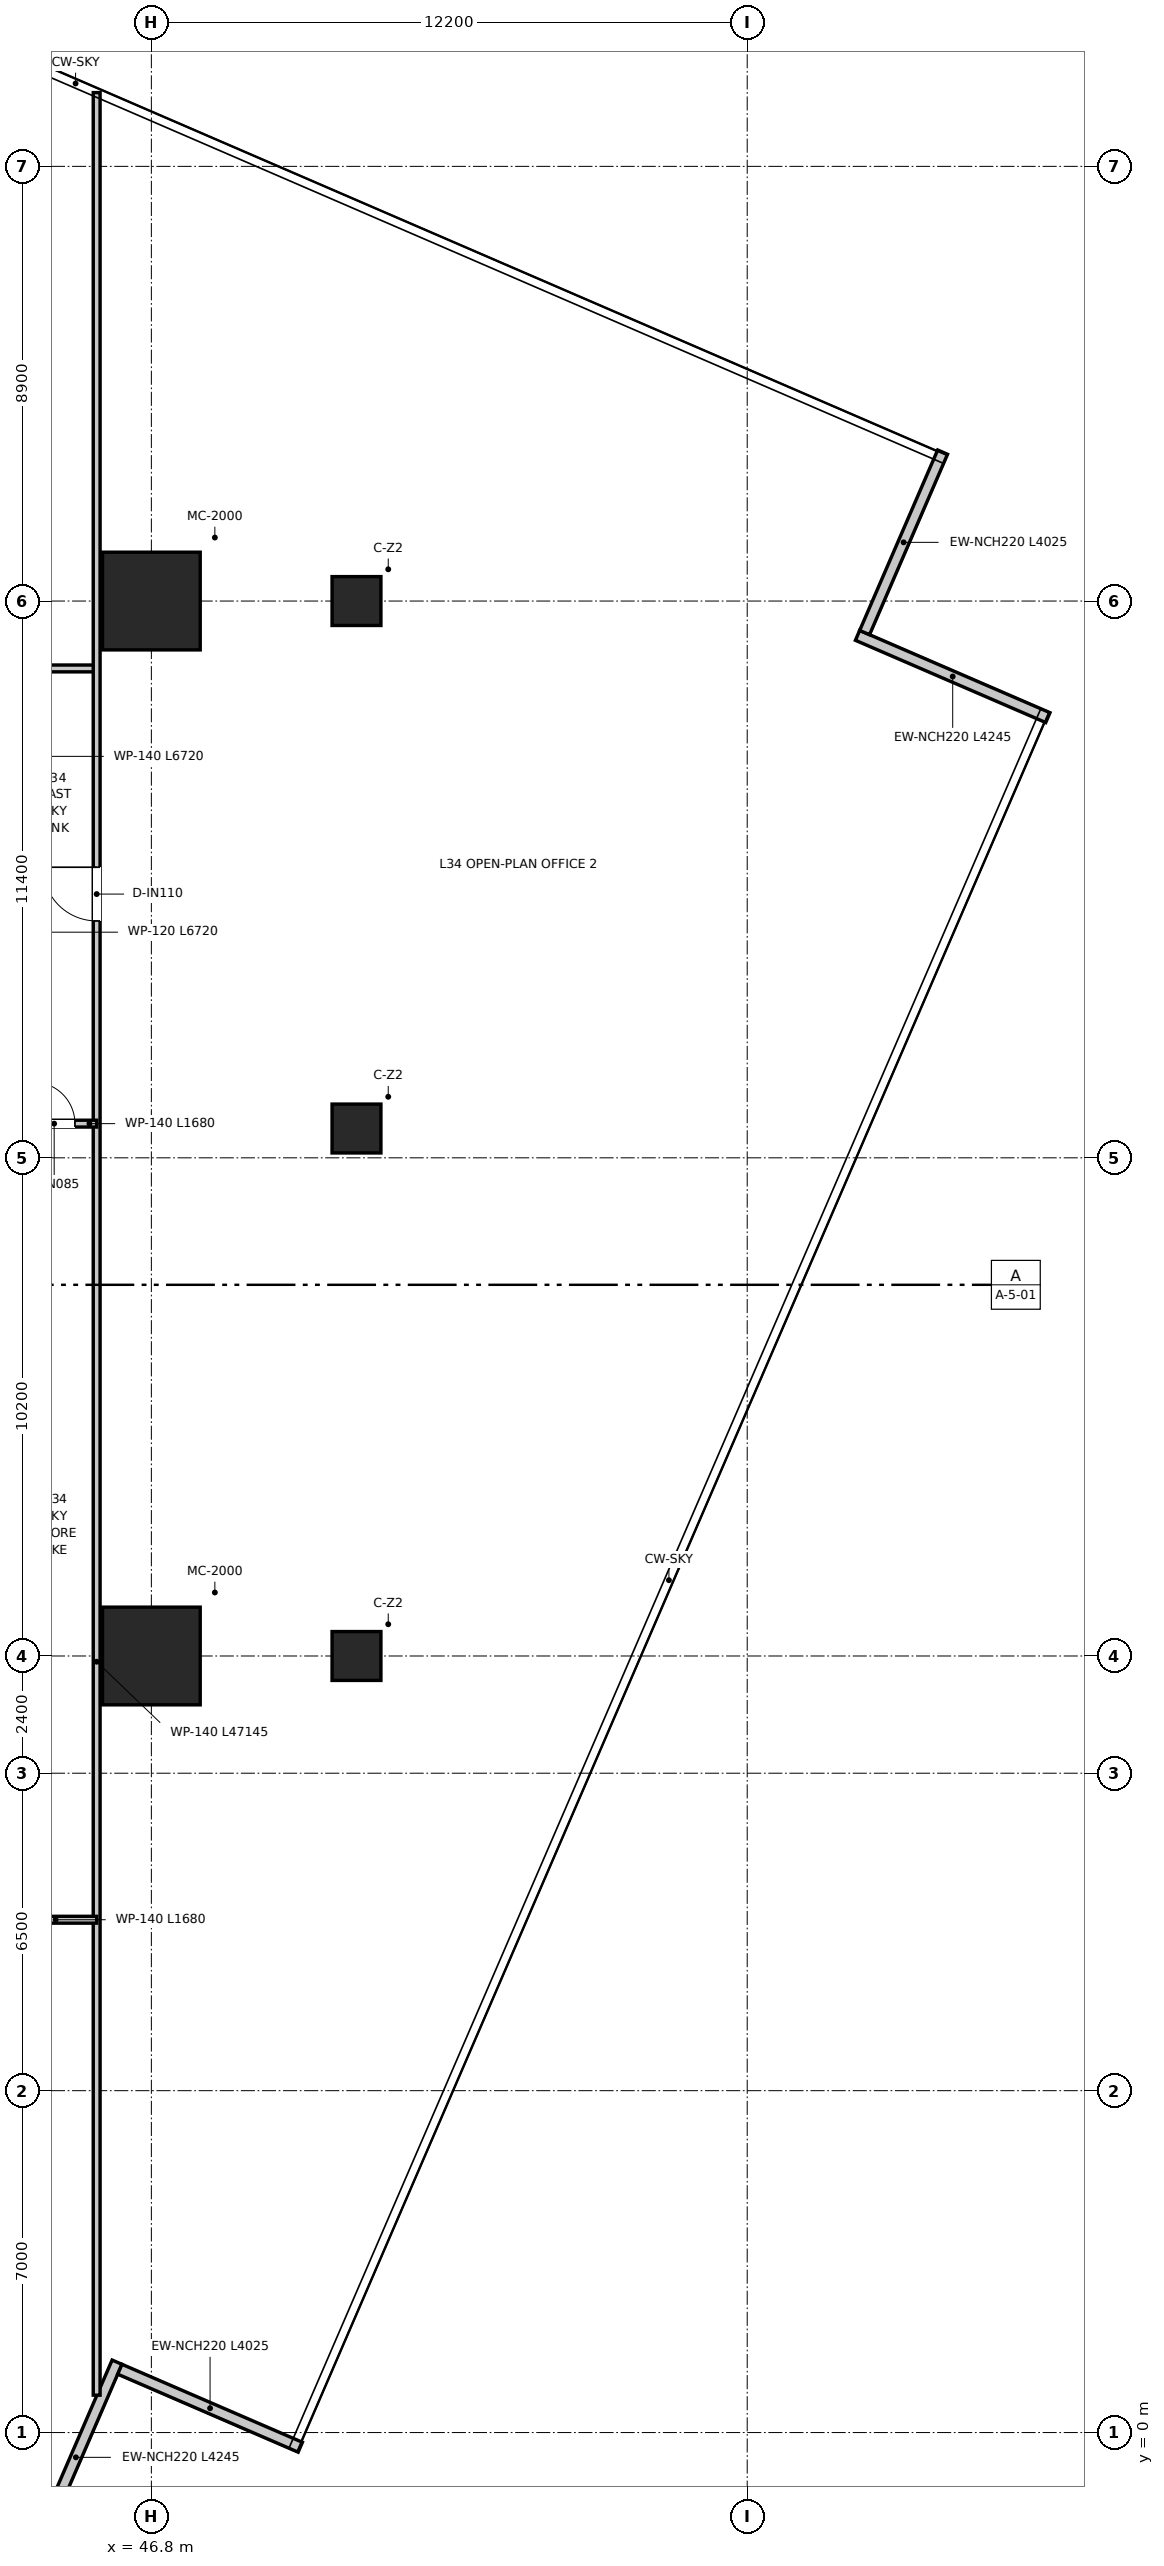
"""IFC4 building model, lengths in metres.
Left out: names, types, materials, properties, quantities, classifications, styles, units other than length and angle.
Written with IfcOpenShell. Run it as: python <this file> out.ifc"""

import sys

from ifc_helpers import new_model, si_unit, direction, frame, frame_2d, origin, origin_2d, place, context, subcontext, project, spatial, rectangle, extrude, source, transform, mapped, element, fill, save


model = new_model("IFC4")
c1 = context("Model", 3, precision=1e-05, world=origin(), true_north=direction((0.0, 1.0)))
c2 = subcontext(c1, "Body", "Model", "MODEL_VIEW")
j1 = project(units=[si_unit("LENGTHUNIT", "METRE"), si_unit("PLANEANGLEUNIT", "RADIAN")], contexts=[c1])
p1 = place(None, origin())
s1 = spatial("IfcSite", under=j1, at=p1, CompositionType="ELEMENT")
p2 = place(p1, origin())
s2 = spatial("IfcBuilding", under=s1, at=p2, CompositionType="ELEMENT")
p3 = place(p2, frame((0.0, 0.0, 141.4)))
s3 = spatial("IfcBuildingStorey", under=s2, at=p3, CompositionType="ELEMENT", Elevation=141.4)
m1 = source(origin(), c2, "Body", "SweptSolid", [
    extrude(rectangle(XDim=2.0, YDim=2.0, at=origin_2d()), origin(), (0.0, 0.0, 1.0), 4.8),
])
for number, where, z_axis, x_axis in (
    (1, (46.8, 15.9, 0.0), (0.0, 0.0, 1.0), (1.0, 0.0, 0.0)),
    (2, (46.8, 37.5, 0.0), (0.0, 0.0, 1.0), (1.0, 0.0, 0.0)),
):
    element("IfcColumn", number, at=place(p3, frame(where, z_axis=z_axis, x_axis=x_axis)), inside=s3, PredefinedType="USERDEFINED", context=c2, shape_type="MappedRepresentation", body=[
        mapped(m1, transform((0.0, 0.0, 0.0), x_axis=(1.0, 0.0, 0.0), y_axis=(0.0, 1.0, 0.0), z_axis=(0.0, 0.0, 1.0), scale=1.0)),
    ])
m2 = source(origin(), c2, "Body", "SweptSolid", [
    extrude(rectangle(XDim=1.0, YDim=1.0, at=origin_2d()), origin(), (0.0, 0.0, 1.0), 4.8),
])
for number, where, z_axis, x_axis in (
    (3, (51.0, 37.5, 0.0), (0.0, 0.0, 1.0), (1.0, 0.0, 0.0)),
    (4, (51.0, 26.7, 0.0), (0.0, 0.0, 1.0), (1.0, 0.0, 0.0)),
    (5, (51.0, 15.9, 0.0), (0.0, 0.0, 1.0), (1.0, 0.0, 0.0)),
):
    element("IfcColumn", number, at=place(p3, frame(where, z_axis=z_axis, x_axis=x_axis)), inside=s3, PredefinedType="COLUMN", context=c2, shape_type="MappedRepresentation", body=[
        mapped(m2, transform((0.0, 0.0, 0.0), x_axis=(1.0, 0.0, 0.0), y_axis=(0.0, 1.0, 0.0), z_axis=(0.0, 0.0, 1.0), scale=1.0)),
    ])
p4 = place(p3, frame((44.413, -2.456, 0.0), z_axis=(0.0, 0.0, 1.0), x_axis=(0.396714717511, 0.917941955088, 0.0)))
e6 = element("IfcWall", 6, at=p4, inside=s3, PredefinedType="ELEMENTEDWALL", context=c2, shape_type="SweptSolid", body=[
    extrude(rectangle(XDim=4.245, YDim=0.22, at=frame_2d((2.123, 0.0))), origin(), (0.0, 0.0, 1.0), 4.52),
])
p5 = place(p3, frame((46.155, 1.296, 0.0), z_axis=(0.0, 0.0, 1.0), x_axis=(0.91792331666, -0.396757841424, 0.0)))
e7 = element("IfcWall", 7, at=p5, inside=s3, PredefinedType="ELEMENTEDWALL", context=c2, shape_type="SweptSolid", body=[
    extrude(rectangle(XDim=4.025, YDim=0.22, at=frame_2d((2.012, 0.0))), origin(), (0.0, 0.0, 1.0), 4.52),
])
p6 = place(p3, frame((65.156, 35.113, 0.0), z_axis=(0.0, 0.0, 1.0), x_axis=(-0.917941955088, 0.396714717511, 0.0)))
e8 = element("IfcWall", 8, at=p6, inside=s3, PredefinedType="ELEMENTEDWALL", context=c2, shape_type="SweptSolid", body=[
    extrude(rectangle(XDim=4.245, YDim=0.22, at=frame_2d((2.123, 0.0))), origin(), (0.0, 0.0, 1.0), 4.52),
])
p7 = place(p3, frame((61.404, 36.854, 0.0), z_axis=(0.0, 0.0, 1.0), x_axis=(0.396735751645, 0.917932864302, 0.0)))
e9 = element("IfcWall", 9, at=p7, inside=s3, PredefinedType="ELEMENTEDWALL", context=c2, shape_type="SweptSolid", body=[
    extrude(rectangle(XDim=4.025, YDim=0.22, at=frame_2d((2.013, 0.0))), origin(), (0.0, 0.0, 1.0), 4.52),
])
p8 = place(p3, frame((26.32, 36.12, 0.0), z_axis=(0.0, 0.0, 1.0), x_axis=(1.0, 0.0, 0.0)))
e10 = element("IfcWall", 10, at=p8, inside=s3, PredefinedType="PARTITIONING", context=c2, shape_type="SweptSolid", body=[
    extrude(rectangle(XDim=19.36, YDim=0.14, at=frame_2d((9.68, 0.0))), origin(), (0.0, 0.0, 1.0), 3.93),
])
p9 = place(p8, frame((4.24, 0.0, 0.0)))
e11 = element("IfcOpeningElement", 11, at=p9, cuts=e10, PredefinedType="OPENING", context=c2, shape_type="SweptSolid", body=[
    extrude(rectangle(XDim=1.2, YDim=2.15, at=frame_2d((0.6, 1.075))), frame((0.0, 0.08, 0.0), z_axis=(0.0, -1.0, 0.0), x_axis=(1.0, 0.0, 0.0)), (0.0, 0.0, 1.0), 0.16),
])
p10 = place(p8, frame((13.92, 0.0, 0.0)))
e12 = element("IfcOpeningElement", 12, at=p10, cuts=e10, PredefinedType="OPENING", context=c2, shape_type="SweptSolid", body=[
    extrude(rectangle(XDim=1.2, YDim=2.15, at=frame_2d((0.6, 1.075))), frame((0.0, 0.08, 0.0), z_axis=(0.0, -1.0, 0.0), x_axis=(1.0, 0.0, 0.0)), (0.0, 0.0, 1.0), 0.16),
])
p11 = place(p3, frame((45.68, 0.765, 0.0), z_axis=(0.0, 0.0, 1.0), x_axis=(0.0, 1.0, 0.0)))
e13 = element("IfcWall", 13, at=p11, inside=s3, PredefinedType="PARTITIONING", context=c2, shape_type="SweptSolid", body=[
    extrude(rectangle(XDim=47.145, YDim=0.14, at=frame_2d((23.573, 0.0))), origin(), (0.0, 0.0, 1.0), 3.82),
])
p12 = place(p11, frame((30.185, 0.0, 0.0)))
e14 = element("IfcOpeningElement", 14, at=p12, cuts=e13, PredefinedType="OPENING", context=c2, shape_type="SweptSolid", body=[
    extrude(rectangle(XDim=1.1, YDim=2.15, at=frame_2d((0.55, 1.075))), frame((0.0, 0.08, 0.0), z_axis=(0.0, -1.0, 0.0), x_axis=(1.0, 0.0, 0.0)), (0.0, 0.0, 1.0), 0.16),
])
p13 = place(p3, frame((44.0, 26.8, 0.0), z_axis=(0.0, 0.0, 1.0), x_axis=(1.0, 0.0, 0.0)))
e15 = element("IfcWall", 15, at=p13, inside=s3, PredefinedType="PARTITIONING", context=c2, shape_type="SweptSolid", body=[
    extrude(rectangle(XDim=1.68, YDim=0.14, at=frame_2d((0.84, 0.0))), origin(), (0.0, 0.0, 1.0), 3.93),
])
p14 = place(p13, frame((0.385, 0.0, 0.0)))
e16 = element("IfcOpeningElement", 16, at=p14, cuts=e15, PredefinedType="OPENING", context=c2, shape_type="SweptSolid", body=[
    extrude(rectangle(XDim=0.85, YDim=2.1, at=frame_2d((0.425, 1.05))), frame((0.0, 0.08, 0.0), z_axis=(0.0, -1.0, 0.0), x_axis=(1.0, 0.0, 0.0)), (0.0, 0.0, 1.0), 0.16),
])
p15 = place(p3, frame((44.0, 10.5, 0.0), z_axis=(0.0, 0.0, 1.0), x_axis=(1.0, 0.0, 0.0)))
e17 = element("IfcWall", 17, at=p15, inside=s3, PredefinedType="PARTITIONING", context=c2, shape_type="SweptSolid", body=[
    extrude(rectangle(XDim=1.68, YDim=0.14, at=frame_2d((0.84, 0.0))), origin(), (0.0, 0.0, 1.0), 4.52),
])
p16 = place(p12, origin())
e18 = element("IfcDoor", 18, at=p16, inside=s3, OperationType="SINGLE_SWING_RIGHT", PredefinedType="DOOR", context=c2, shape_type="SweptSolid", body=[
    extrude(rectangle(XDim=1.1, YDim=2.15, at=frame_2d((0.55, 1.075))), frame((0.0, 0.025, 0.0), z_axis=(0.0, -1.0, 0.0), x_axis=(1.0, 0.0, 0.0)), (0.0, 0.0, 1.0), 0.05),
])
fill(e14, e18)
p17 = place(p14, origin())
e19 = element("IfcDoor", 19, at=p17, inside=s3, OperationType="SINGLE_SWING_LEFT", PredefinedType="DOOR", context=c2, shape_type="SweptSolid", body=[
    extrude(rectangle(XDim=0.85, YDim=2.1, at=frame_2d((0.425, 1.05))), frame((0.0, 0.025, 0.0), z_axis=(0.0, -1.0, 0.0), x_axis=(1.0, 0.0, 0.0)), (0.0, 0.0, 1.0), 0.05),
])
fill(e16, e19)
save(model, sys.argv[1])
